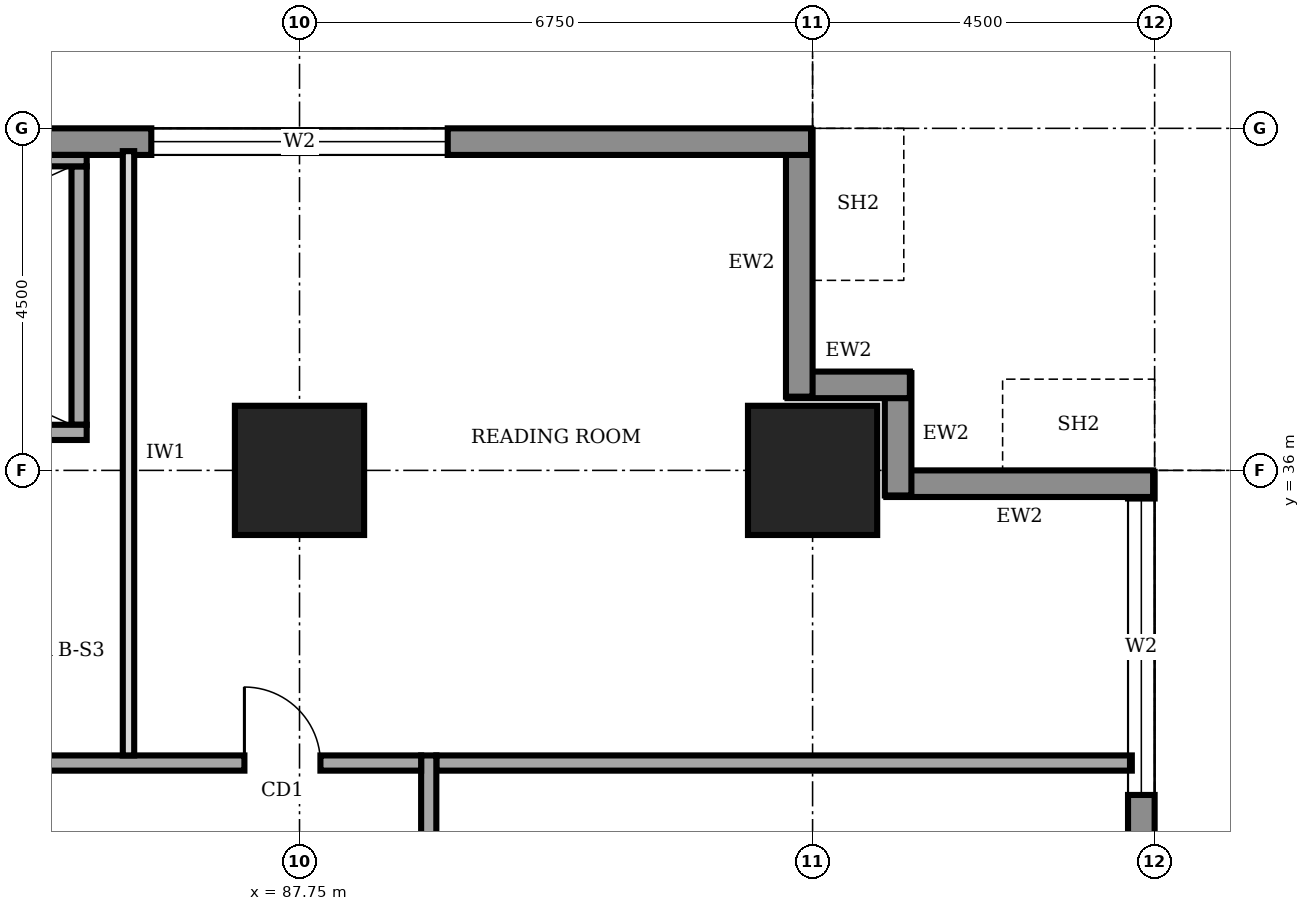
"""IFC4 building model, lengths in metres.
Left out: names, types, materials, properties, quantities, classifications, styles, units other than length and angle.
Written with IfcOpenShell. Run it as: python <this file> out.ifc"""

import sys

from ifc_helpers import new_model, si_unit, direction, frame, frame_2d, origin, origin_2d, place, context, subcontext, project, spatial, rectangle, extrude, element, fill, save


model = new_model("IFC4")
c1 = context("Model", 3, precision=1e-05, world=origin(), true_north=direction((0.0, 1.0)))
c2 = subcontext(c1, "Body", "Model", "MODEL_VIEW")
j1 = project(units=[si_unit("LENGTHUNIT", "METRE"), si_unit("PLANEANGLEUNIT", "RADIAN")], contexts=[c1])
p1 = place(None, origin())
s1 = spatial("IfcSite", under=j1, at=p1, CompositionType="ELEMENT")
p2 = place(p1, origin())
s2 = spatial("IfcBuilding", under=s1, at=p2, CompositionType="ELEMENT")
p3 = place(p2, frame((0.0, 0.0, 49.0)))
s3 = spatial("IfcBuildingStorey", under=s2, at=p3, CompositionType="ELEMENT", Elevation=49.0)
for number, where, z_axis, x_axis in (
    (1, (87.75, 36.0, 0.0), (0.0, 0.0, 1.0), (1.0, 0.0, 0.0)),
    (2, (94.5, 36.0, 0.0), (0.0, 0.0, 1.0), (1.0, 0.0, 0.0)),
):
    element("IfcColumn", number, at=place(p3, frame(where, z_axis=z_axis, x_axis=x_axis)), inside=s3, PredefinedType="COLUMN", context=c2, shape_type="SweptSolid", body=[
        extrude(rectangle(XDim=1.7, YDim=1.7, at=origin_2d()), origin(), (0.0, 0.0, 1.0), 4.0),
    ])
p4 = place(p3, frame((98.825, 4.52, 0.0), z_axis=(0.0, 0.0, 1.0), x_axis=(0.0, 1.0, 0.0)))
e3 = element("IfcWall", 3, at=p4, inside=s3, PredefinedType="STANDARD", context=c2, shape_type="SweptSolid", body=[
    extrude(rectangle(XDim=31.46, YDim=0.35, at=frame_2d((15.73, 0.0))), origin(), (0.0, 0.0, 1.0), 3.75),
])
p5 = place(p4, frame((4.78, 0.0, 0.6)))
e4 = element("IfcOpeningElement", 4, at=p5, cuts=e3, PredefinedType="OPENING", context=c2, shape_type="SweptSolid", body=[
    extrude(rectangle(XDim=3.9, YDim=2.6, at=frame_2d((1.95, 1.3))), frame((0.0, 0.185, 0.0), z_axis=(0.0, -1.0, 0.0), x_axis=(1.0, 0.0, 0.0)), (0.0, 0.0, 1.0), 0.37),
])
p6 = place(p4, frame((9.28, 0.0, 0.6)))
e5 = element("IfcOpeningElement", 5, at=p6, cuts=e3, PredefinedType="OPENING", context=c2, shape_type="SweptSolid", body=[
    extrude(rectangle(XDim=3.9, YDim=2.6, at=frame_2d((1.95, 1.3))), frame((0.0, 0.185, 0.0), z_axis=(0.0, -1.0, 0.0), x_axis=(1.0, 0.0, 0.0)), (0.0, 0.0, 1.0), 0.37),
])
p7 = place(p4, frame((13.78, 0.0, 0.6)))
e6 = element("IfcOpeningElement", 6, at=p7, cuts=e3, PredefinedType="OPENING", context=c2, shape_type="SweptSolid", body=[
    extrude(rectangle(XDim=3.9, YDim=2.6, at=frame_2d((1.95, 1.3))), frame((0.0, 0.185, 0.0), z_axis=(0.0, -1.0, 0.0), x_axis=(1.0, 0.0, 0.0)), (0.0, 0.0, 1.0), 0.37),
])
p8 = place(p4, frame((18.28, 0.0, 0.6)))
e7 = element("IfcOpeningElement", 7, at=p8, cuts=e3, PredefinedType="OPENING", context=c2, shape_type="SweptSolid", body=[
    extrude(rectangle(XDim=3.9, YDim=2.6, at=frame_2d((1.95, 1.3))), frame((0.0, 0.185, 0.0), z_axis=(0.0, -1.0, 0.0), x_axis=(1.0, 0.0, 0.0)), (0.0, 0.0, 1.0), 0.37),
])
p9 = place(p4, frame((22.78, 0.0, 0.6)))
e8 = element("IfcOpeningElement", 8, at=p9, cuts=e3, PredefinedType="OPENING", context=c2, shape_type="SweptSolid", body=[
    extrude(rectangle(XDim=3.9, YDim=2.6, at=frame_2d((1.95, 1.3))), frame((0.0, 0.185, 0.0), z_axis=(0.0, -1.0, 0.0), x_axis=(1.0, 0.0, 0.0)), (0.0, 0.0, 1.0), 0.37),
])
p10 = place(p4, frame((27.21, 0.0, 0.6)))
e9 = element("IfcOpeningElement", 9, at=p10, cuts=e3, PredefinedType="OPENING", context=c2, shape_type="SweptSolid", body=[
    extrude(rectangle(XDim=3.9, YDim=2.6, at=frame_2d((1.95, 1.3))), frame((0.0, 0.185, 0.0), z_axis=(0.0, -1.0, 0.0), x_axis=(1.0, 0.0, 0.0)), (0.0, 0.0, 1.0), 0.37),
])
p11 = place(p3, frame((98.98, 35.825, 0.0), z_axis=(0.0, 0.0, 1.0), x_axis=(-1.0, 0.0, 0.0)))
e10 = element("IfcWall", 10, at=p11, inside=s3, PredefinedType="STANDARD", context=c2, shape_type="SweptSolid", body=[
    extrude(rectangle(XDim=3.51, YDim=0.35, at=frame_2d((1.755, 0.0))), origin(), (0.0, 0.0, 1.0), 2.85),
])
for number, where, z_axis, x_axis in (
    (11, (95.625, 35.67, 0.0), (0.0, 0.0, 1.0), (0.0, 1.0, 0.0)),
    (12, (95.78, 37.125, 0.0), (0.0, 0.0, 1.0), (-1.0, 0.0, 0.0)),
):
    element("IfcWall", number, at=place(p3, frame(where, z_axis=z_axis, x_axis=x_axis)), inside=s3, PredefinedType="STANDARD", context=c2, shape_type="SweptSolid", body=[
        extrude(rectangle(XDim=1.61, YDim=0.35, at=frame_2d((0.805, 0.0))), origin(), (0.0, 0.0, 1.0), 3.75),
    ])
p12 = place(p3, frame((94.325, 36.97, 0.0), z_axis=(0.0, 0.0, 1.0), x_axis=(0.0, 1.0, 0.0)))
e13 = element("IfcWall", 13, at=p12, inside=s3, PredefinedType="STANDARD", context=c2, shape_type="SweptSolid", body=[
    extrude(rectangle(XDim=3.51, YDim=0.35, at=frame_2d((1.755, 0.0))), origin(), (0.0, 0.0, 1.0), 2.85),
])
p13 = place(p3, frame((94.48, 40.325, 0.0), z_axis=(0.0, 0.0, 1.0), x_axis=(-1.0, 0.0, 0.0)))
e14 = element("IfcWall", 14, at=p13, inside=s3, PredefinedType="STANDARD", context=c2, shape_type="SweptSolid", body=[
    extrude(rectangle(XDim=26.96, YDim=0.35, at=frame_2d((13.48, 0.0))), origin(), (0.0, 0.0, 1.0), 3.75),
])
p14 = place(p13, frame((22.71, 0.0, 0.6)))
e15 = element("IfcOpeningElement", 15, at=p14, cuts=e14, PredefinedType="OPENING", context=c2, shape_type="SweptSolid", body=[
    extrude(rectangle(XDim=3.9, YDim=2.6, at=frame_2d((1.95, 1.3))), frame((0.0, 0.185, 0.0), z_axis=(0.0, -1.0, 0.0), x_axis=(1.0, 0.0, 0.0)), (0.0, 0.0, 1.0), 0.37),
])
p15 = place(p13, frame((18.28, 0.0, 0.6)))
e16 = element("IfcOpeningElement", 16, at=p15, cuts=e14, PredefinedType="OPENING", context=c2, shape_type="SweptSolid", body=[
    extrude(rectangle(XDim=3.9, YDim=2.6, at=frame_2d((1.95, 1.3))), frame((0.0, 0.185, 0.0), z_axis=(0.0, -1.0, 0.0), x_axis=(1.0, 0.0, 0.0)), (0.0, 0.0, 1.0), 0.37),
])
p16 = place(p13, frame((4.78, 0.0, 0.6)))
e17 = element("IfcOpeningElement", 17, at=p16, cuts=e14, PredefinedType="OPENING", context=c2, shape_type="SweptSolid", body=[
    extrude(rectangle(XDim=3.9, YDim=2.6, at=frame_2d((1.95, 1.3))), frame((0.0, 0.185, 0.0), z_axis=(0.0, -1.0, 0.0), x_axis=(1.0, 0.0, 0.0)), (0.0, 0.0, 1.0), 0.37),
])
p17 = place(p3, frame((89.45, 9.2, 0.0), z_axis=(0.0, 0.0, 1.0), x_axis=(0.0, 1.0, 0.0)))
e18 = element("IfcWall", 18, at=p17, inside=s3, PredefinedType="SOLIDWALL", context=c2, shape_type="SweptSolid", body=[
    extrude(rectangle(XDim=23.05, YDim=0.2, at=frame_2d((11.525, 0.0))), origin(), (0.0, 0.0, 1.0), 3.75),
])
p18 = place(p17, frame((1.55, 0.0, 0.0)))
e19 = element("IfcOpeningElement", 19, at=p18, cuts=e18, PredefinedType="OPENING", context=c2, shape_type="SweptSolid", body=[
    extrude(rectangle(XDim=1.0, YDim=2.1, at=frame_2d((0.5, 1.05))), frame((0.0, 0.11, 0.0), z_axis=(0.0, -1.0, 0.0), x_axis=(1.0, 0.0, 0.0)), (0.0, 0.0, 1.0), 0.22),
])
p19 = place(p17, frame((4.9, 0.0, 0.0)))
e20 = element("IfcOpeningElement", 20, at=p19, cuts=e18, PredefinedType="OPENING", context=c2, shape_type="SweptSolid", body=[
    extrude(rectangle(XDim=1.0, YDim=2.1, at=frame_2d((0.5, 1.05))), frame((0.0, 0.11, 0.0), z_axis=(0.0, -1.0, 0.0), x_axis=(1.0, 0.0, 0.0)), (0.0, 0.0, 1.0), 0.22),
])
p20 = place(p17, frame((8.0, 0.0, 0.0)))
e21 = element("IfcOpeningElement", 21, at=p20, cuts=e18, PredefinedType="OPENING", context=c2, shape_type="SweptSolid", body=[
    extrude(rectangle(XDim=0.9, YDim=2.1, at=frame_2d((0.45, 1.05))), frame((0.0, 0.11, 0.0), z_axis=(0.0, -1.0, 0.0), x_axis=(1.0, 0.0, 0.0)), (0.0, 0.0, 1.0), 0.22),
])
p21 = place(p17, frame((11.05, 0.0, 0.0)))
e22 = element("IfcOpeningElement", 22, at=p21, cuts=e18, PredefinedType="OPENING", context=c2, shape_type="SweptSolid", body=[
    extrude(rectangle(XDim=0.9, YDim=2.1, at=frame_2d((0.45, 1.05))), frame((0.0, 0.11, 0.0), z_axis=(0.0, -1.0, 0.0), x_axis=(1.0, 0.0, 0.0)), (0.0, 0.0, 1.0), 0.22),
])
p22 = place(p17, frame((15.75, 0.0, 0.0)))
e23 = element("IfcOpeningElement", 23, at=p22, cuts=e18, PredefinedType="OPENING", context=c2, shape_type="SweptSolid", body=[
    extrude(rectangle(XDim=0.9, YDim=2.1, at=frame_2d((0.45, 1.05))), frame((0.0, 0.11, 0.0), z_axis=(0.0, -1.0, 0.0), x_axis=(1.0, 0.0, 0.0)), (0.0, 0.0, 1.0), 0.22),
])
p23 = place(p17, frame((13.1, 0.0, 0.0)))
e24 = element("IfcOpeningElement", 24, at=p23, cuts=e18, PredefinedType="OPENING", context=c2, shape_type="SweptSolid", body=[
    extrude(rectangle(XDim=1.0, YDim=2.1, at=frame_2d((0.5, 1.05))), frame((0.0, 0.11, 0.0), z_axis=(0.0, -1.0, 0.0), x_axis=(1.0, 0.0, 0.0)), (0.0, 0.0, 1.0), 0.22),
])
p24 = place(p17, frame((19.925, 0.0, 0.0)))
e25 = element("IfcOpeningElement", 25, at=p24, cuts=e18, PredefinedType="OPENING", context=c2, shape_type="SweptSolid", body=[
    extrude(rectangle(XDim=1.0, YDim=2.1, at=frame_2d((0.5, 1.05))), frame((0.0, 0.11, 0.0), z_axis=(0.0, -1.0, 0.0), x_axis=(1.0, 0.0, 0.0)), (0.0, 0.0, 1.0), 0.22),
])
p25 = place(p3, frame((89.35, 32.15, 0.0), z_axis=(0.0, 0.0, 1.0), x_axis=(-1.0, 0.0, 0.0)))
e26 = element("IfcWall", 26, at=p25, inside=s3, PredefinedType="SOLIDWALL", context=c2, shape_type="SweptSolid", body=[
    extrude(rectangle(XDim=17.65, YDim=0.2, at=frame_2d((8.825, 0.0))), origin(), (0.0, 0.0, 1.0), 3.75),
])
p26 = place(p25, frame((14.75, 0.0, 0.0)))
e27 = element("IfcOpeningElement", 27, at=p26, cuts=e26, PredefinedType="OPENING", context=c2, shape_type="SweptSolid", body=[
    extrude(rectangle(XDim=1.0, YDim=2.1, at=frame_2d((0.5, 1.05))), frame((0.0, 0.11, 0.0), z_axis=(0.0, -1.0, 0.0), x_axis=(1.0, 0.0, 0.0)), (0.0, 0.0, 1.0), 0.22),
])
p27 = place(p25, frame((7.85, 0.0, 0.0)))
e28 = element("IfcOpeningElement", 28, at=p27, cuts=e26, PredefinedType="OPENING", context=c2, shape_type="SweptSolid", body=[
    extrude(rectangle(XDim=1.0, YDim=2.1, at=frame_2d((0.5, 1.05))), frame((0.0, 0.11, 0.0), z_axis=(0.0, -1.0, 0.0), x_axis=(1.0, 0.0, 0.0)), (0.0, 0.0, 1.0), 0.22),
])
p28 = place(p25, frame((1.325, 0.0, 0.0)))
e29 = element("IfcOpeningElement", 29, at=p28, cuts=e26, PredefinedType="OPENING", context=c2, shape_type="SweptSolid", body=[
    extrude(rectangle(XDim=1.0, YDim=2.1, at=frame_2d((0.5, 1.05))), frame((0.0, 0.11, 0.0), z_axis=(0.0, -1.0, 0.0), x_axis=(1.0, 0.0, 0.0)), (0.0, 0.0, 1.0), 0.22),
])
p29 = place(p3, frame((89.55, 32.15, 0.0), z_axis=(0.0, 0.0, 1.0), x_axis=(1.0, 0.0, 0.0)))
e30 = element("IfcWall", 30, at=p29, inside=s3, PredefinedType="SOLIDWALL", context=c2, shape_type="SweptSolid", body=[
    extrude(rectangle(XDim=9.15, YDim=0.2, at=frame_2d((4.575, 0.0))), origin(), (0.0, 0.0, 1.0), 3.75),
])
p30 = place(p3, frame((85.5, 32.25, 0.0), z_axis=(0.0, 0.0, 1.0), x_axis=(0.0, 1.0, 0.0)))
e31 = element("IfcWall", 31, at=p30, inside=s3, PredefinedType="PARTITIONING", context=c2, shape_type="SweptSolid", body=[
    extrude(rectangle(XDim=7.95, YDim=0.15, at=frame_2d((3.975, 0.0))), origin(), (0.0, 0.0, 1.0), 3.75),
])
p31 = place(p3, frame((77.05, 36.5, 0.0), z_axis=(0.0, 0.0, 1.0), x_axis=(1.0, 0.0, 0.0)))
e32 = element("IfcWall", 32, at=p31, inside=s3, PredefinedType="SOLIDWALL", context=c2, shape_type="SweptSolid", body=[
    extrude(rectangle(XDim=7.9, YDim=0.2, at=frame_2d((3.95, 0.0))), origin(), (0.0, 0.0, 1.0), 3.75),
])
p32 = place(p31, frame((6.3, 0.0, 0.0)))
e33 = element("IfcOpeningElement", 33, at=p32, cuts=e32, PredefinedType="OPENING", context=c2, shape_type="SweptSolid", body=[
    extrude(rectangle(XDim=1.0, YDim=2.1, at=frame_2d((0.5, 1.05))), frame((0.0, 0.11, 0.0), z_axis=(0.0, -1.0, 0.0), x_axis=(1.0, 0.0, 0.0)), (0.0, 0.0, 1.0), 0.22),
])
p33 = place(p3, frame((77.05, 40.075, 0.0), z_axis=(0.0, 0.0, 1.0), x_axis=(1.0, 0.0, 0.0)))
e34 = element("IfcWall", 34, at=p33, inside=s3, PredefinedType="SOLIDWALL", context=c2, shape_type="SweptSolid", body=[
    extrude(rectangle(XDim=7.9, YDim=0.15, at=frame_2d((3.95, 0.0))), origin(), (0.0, 0.0, 1.0), 3.75),
])
p34 = place(p3, frame((84.85, 36.6, 0.0), z_axis=(0.0, 0.0, 1.0), x_axis=(0.0, 1.0, 0.0)))
e35 = element("IfcWall", 35, at=p34, inside=s3, PredefinedType="SOLIDWALL", context=c2, shape_type="SweptSolid", body=[
    extrude(rectangle(XDim=3.4, YDim=0.2, at=frame_2d((1.7, 0.0))), origin(), (0.0, 0.0, 1.0), 3.75),
])
p35 = place(p10, origin())
e36 = element("IfcWindow", 36, at=p35, inside=s3, PartitioningType="SINGLE_PANEL", PredefinedType="WINDOW", context=c2, shape_type="SweptSolid", body=[
    extrude(rectangle(XDim=3.9, YDim=2.6, at=frame_2d((1.95, 1.3))), frame((0.0, 0.03, 0.0), z_axis=(0.0, -1.0, 0.0), x_axis=(1.0, 0.0, 0.0)), (0.0, 0.0, 1.0), 0.06),
])
fill(e9, e36)
p36 = place(p16, origin())
e37 = element("IfcWindow", 37, at=p36, inside=s3, PartitioningType="SINGLE_PANEL", PredefinedType="WINDOW", context=c2, shape_type="SweptSolid", body=[
    extrude(rectangle(XDim=3.9, YDim=2.6, at=frame_2d((1.95, 1.3))), frame((0.0, 0.03, 0.0), z_axis=(0.0, -1.0, 0.0), x_axis=(1.0, 0.0, 0.0)), (0.0, 0.0, 1.0), 0.06),
])
fill(e17, e37)
p37 = place(p28, frame((1.0, 0.0, 0.0), z_axis=(0.0, 0.0, 1.0), x_axis=(-1.0, 0.0, 0.0)))
e38 = element("IfcDoor", 38, at=p37, inside=s3, OperationType="SINGLE_SWING_LEFT", PredefinedType="DOOR", context=c2, shape_type="SweptSolid", body=[
    extrude(rectangle(XDim=1.0, YDim=2.1, at=frame_2d((0.5, 1.05))), frame((0.0, 0.025, 0.0), z_axis=(0.0, -1.0, 0.0), x_axis=(1.0, 0.0, 0.0)), (0.0, 0.0, 1.0), 0.05),
])
fill(e29, e38)
save(model, sys.argv[1])
